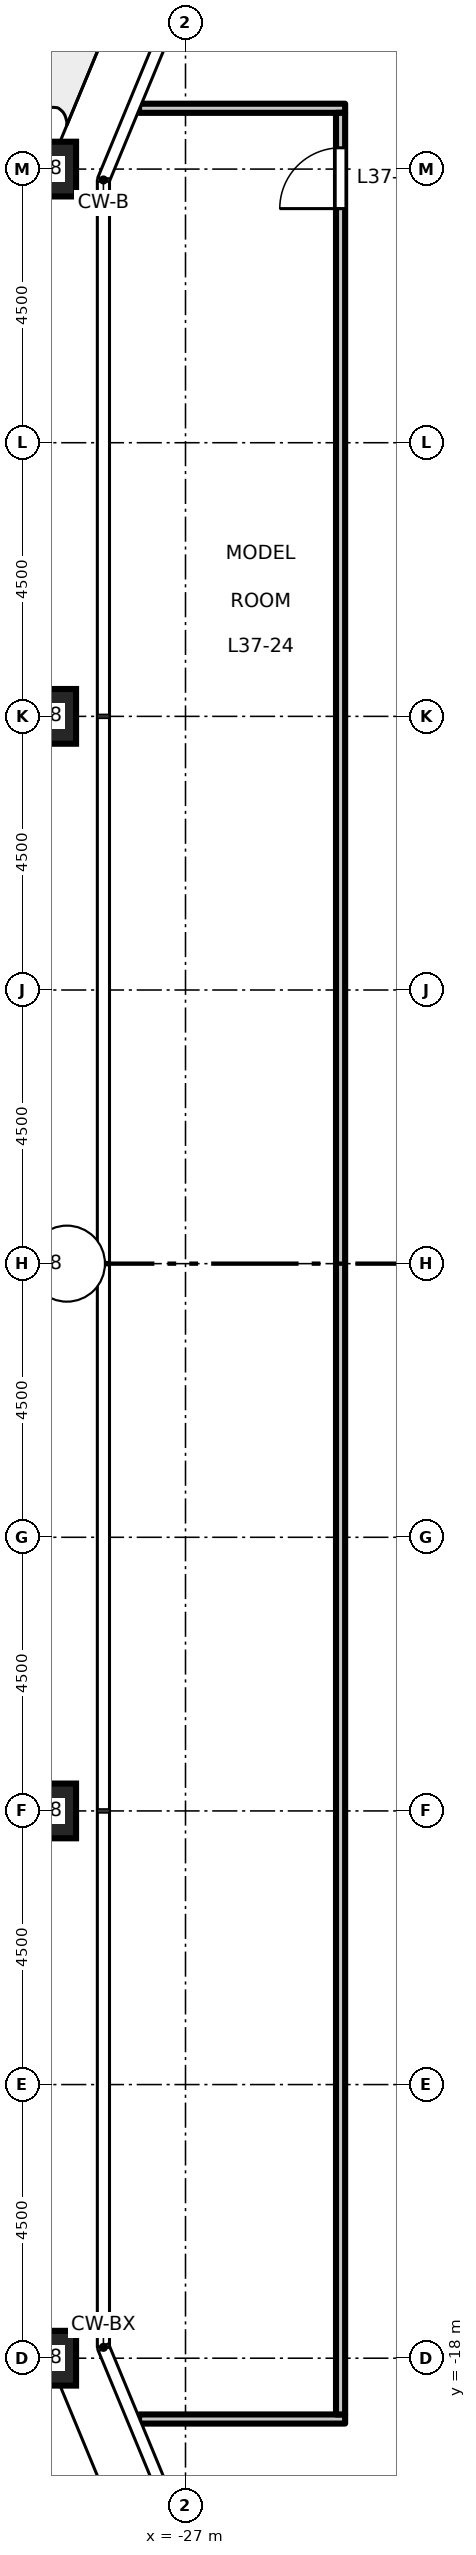
"""IFC4 building model, lengths in metres.
Left out: names, types, materials, properties, quantities, classifications, styles, units other than length and angle.
Written with IfcOpenShell. Run it as: python <this file> out.ifc"""

import sys

from ifc_helpers import new_model, si_unit, direction, frame, frame_2d, origin, origin_2d, place, context, subcontext, project, spatial, rectangle, hollow_rectangle, extrude, element, fill, save


model = new_model("IFC4")
c1 = context("Model", 3, precision=1e-05, world=origin(), true_north=direction((0.0, 1.0)))
c2 = subcontext(c1, "Body", "Model", "MODEL_VIEW")
j1 = project(units=[si_unit("LENGTHUNIT", "METRE"), si_unit("PLANEANGLEUNIT", "RADIAN")], contexts=[c1])
p1 = place(None, origin())
s1 = spatial("IfcSite", under=j1, at=p1, CompositionType="ELEMENT")
p2 = place(p1, origin())
s2 = spatial("IfcBuilding", under=s1, at=p2, CompositionType="ELEMENT")
p3 = place(p2, frame((0.0, 0.0, 172.2)))
s3 = spatial("IfcBuildingStorey", under=s2, at=p3, CompositionType="ELEMENT", Elevation=172.2)
for number, where, z_axis, x_axis in (
    (1, (-29.25, 18.0, 0.0), (0.0, 0.0, 1.0), (1.0, 0.0, 0.0)),
    (2, (-29.25, 9.0, 0.0), (0.0, 0.0, 1.0), (1.0, 0.0, 0.0)),
    (3, (-29.25, 0.0, 0.0), (0.0, 0.0, 1.0), (1.0, 0.0, 0.0)),
    (4, (-29.25, -9.0, 0.0), (0.0, 0.0, 1.0), (1.0, 0.0, 0.0)),
    (5, (-29.25, -18.0, 0.0), (0.0, 0.0, 1.0), (1.0, 0.0, 0.0)),
):
    element("IfcColumn", number, at=place(p3, frame(where, z_axis=z_axis, x_axis=x_axis)), inside=s3, PredefinedType="COLUMN", context=c2, shape_type="SweptSolid", body=[
        extrude(hollow_rectangle(XDim=0.9, YDim=0.9, WallThickness=0.05, at=origin_2d()), origin(), (0.0, 0.0, 1.0), 4.5),
    ])
for number, where, z_axis, x_axis in (
    (6, (-27.764, -19.0, 0.0), (0.0, 0.0, 1.0), (1.0, 0.0, 0.0)),
    (7, (-27.764, 19.0, 0.0), (0.0, 0.0, 1.0), (1.0, 0.0, 0.0)),
):
    element("IfcWall", number, at=place(p3, frame(where, z_axis=z_axis, x_axis=x_axis)), inside=s3, PredefinedType="PARTITIONING", context=c2, shape_type="SweptSolid", body=[
        extrude(rectangle(XDim=3.389, YDim=0.15, at=frame_2d((1.694, 0.0))), origin(), (0.0, 0.0, 1.0), 4.35),
    ])
p4 = place(p3, frame((-24.45, -18.925, 0.0), z_axis=(0.0, 0.0, 1.0), x_axis=(0.0, 1.0, 0.0)))
e8 = element("IfcWall", 8, at=p4, inside=s3, PredefinedType="PARTITIONING", context=c2, shape_type="SweptSolid", body=[
    extrude(rectangle(XDim=37.85, YDim=0.15, at=frame_2d((18.925, 0.0))), origin(), (0.0, 0.0, 1.0), 4.35),
])
p5 = place(p4, frame((36.275, 0.0, 0.0)))
e9 = element("IfcOpeningElement", 9, at=p5, cuts=e8, PredefinedType="OPENING", context=c2, shape_type="SweptSolid", body=[
    extrude(rectangle(XDim=1.0, YDim=2.1, at=frame_2d((0.5, 1.05))), frame((0.0, 0.085, 0.0), z_axis=(0.0, -1.0, 0.0), x_axis=(1.0, 0.0, 0.0)), (0.0, 0.0, 1.0), 0.17),
])
p6 = place(p5, origin())
e10 = element("IfcDoor", 10, at=p6, inside=s3, OperationType="SINGLE_SWING_LEFT", PredefinedType="DOOR", context=c2, shape_type="SweptSolid", body=[
    extrude(rectangle(XDim=1.0, YDim=2.1, at=frame_2d((0.5, 1.05))), frame((0.0, 0.025, 0.0), z_axis=(0.0, -1.0, 0.0), x_axis=(1.0, 0.0, 0.0)), (0.0, 0.0, 1.0), 0.05),
])
fill(e9, e10)
save(model, sys.argv[1])
